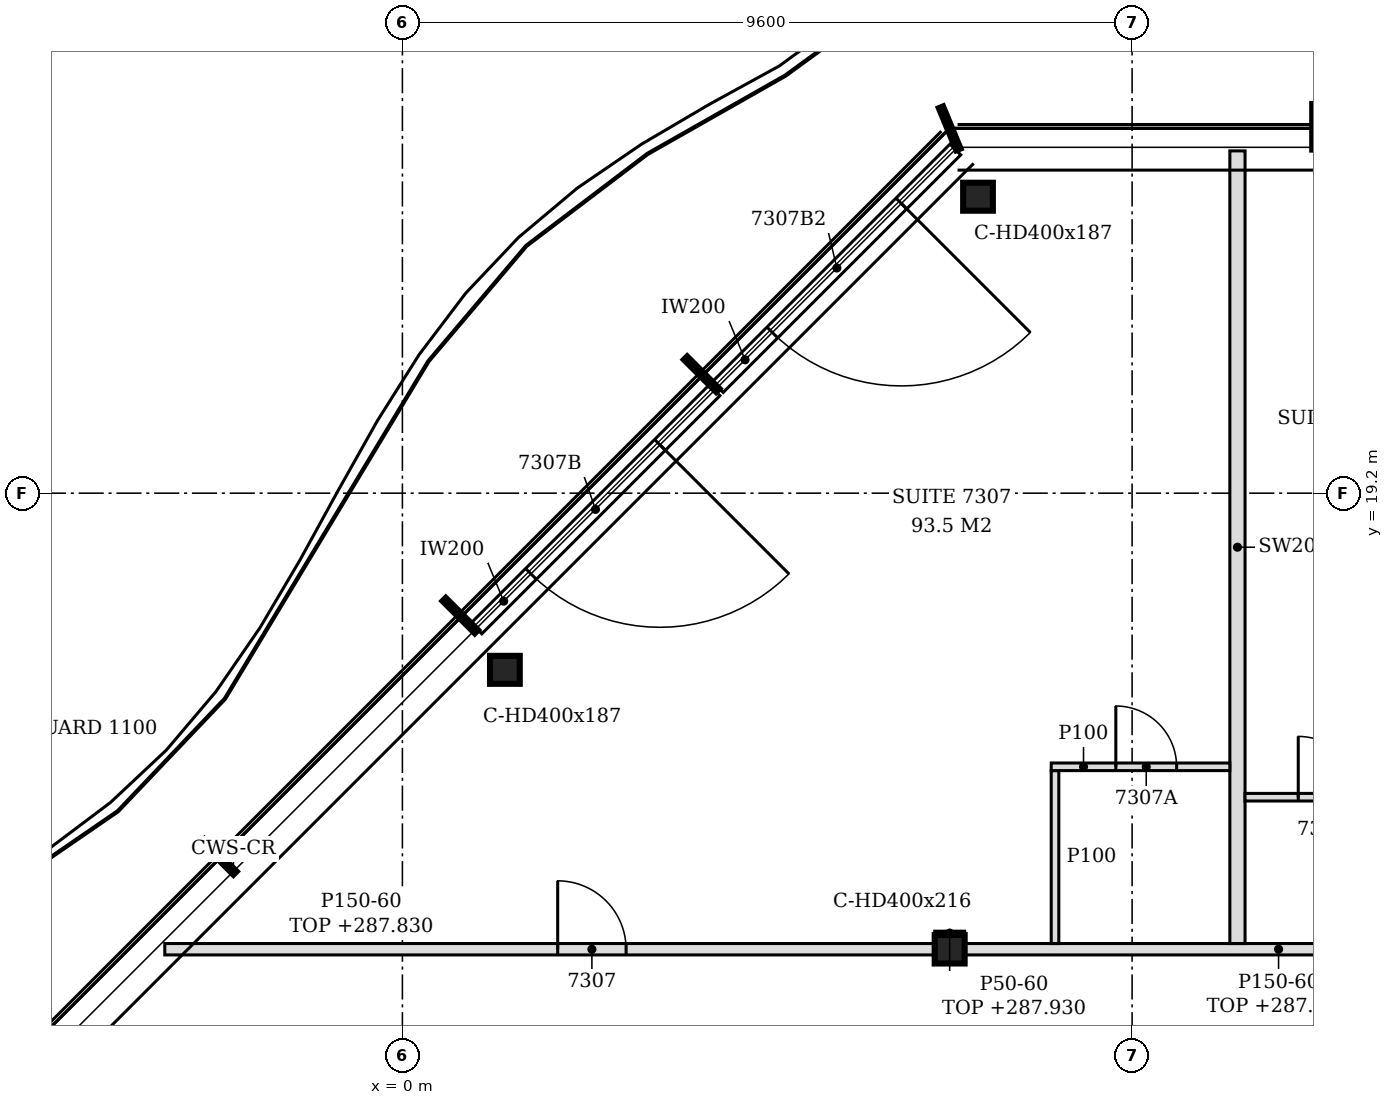
"""IFC4 building model, lengths in metres.
Left out: names, types, materials, properties, quantities, classifications, styles, units other than length and angle.
Written with IfcOpenShell. Run it as: python <this file> out.ifc"""

import sys

from ifc_helpers import new_model, si_unit, direction, frame, frame_2d, origin, origin_2d, place, context, subcontext, project, spatial, polyline, rectangle, i_section, outline, extrude, element, fill, save


model = new_model("IFC4")
c1 = context("Model", 3, precision=1e-05, world=origin(), true_north=direction((0.0, 1.0)))
c2 = subcontext(c1, "Body", "Model", "MODEL_VIEW")
j1 = project(units=[si_unit("LENGTHUNIT", "METRE"), si_unit("PLANEANGLEUNIT", "RADIAN")], contexts=[c1])
p1 = place(None, origin())
s1 = spatial("IfcSite", under=j1, at=p1, CompositionType="ELEMENT")
p2 = place(p1, origin())
s2 = spatial("IfcBuilding", under=s1, at=p2, CompositionType="ELEMENT")
p3 = place(p2, frame((0.0, 0.0, 285.0)))
s3 = spatial("IfcBuildingStorey", under=s2, at=p3, CompositionType="ELEMENT", Elevation=285.0)
for number, where, z_axis, x_axis in (
    (1, (7.573, 23.1, -0.15), (0.0, 0.0, 1.0), (1.0, 0.0, 0.0)),
    (2, (1.348, 16.876, -0.15), (0.0, 0.0, 1.0), (1.0, 0.0, 0.0)),
):
    element("IfcColumn", number, at=place(p3, frame(where, z_axis=z_axis, x_axis=x_axis)), inside=s3, PredefinedType="COLUMN", context=c2, shape_type="SweptSolid", body=[
        extrude(i_section(OverallWidth=0.391, OverallDepth=0.368, WebThickness=0.015, FlangeThickness=0.024, FilletRadius=0.015, at=origin_2d()), origin(), (0.0, 0.0, 1.0), 3.6),
    ])
p4 = place(p3, frame((7.2, 13.2, -0.15), z_axis=(0.0, 0.0, 1.0), x_axis=(1.0, 0.0, 0.0)))
e3 = element("IfcColumn", 3, at=p4, inside=s3, PredefinedType="COLUMN", context=c2, shape_type="SweptSolid", body=[
    extrude(i_section(OverallWidth=0.394, OverallDepth=0.375, WebThickness=0.017, FlangeThickness=0.028, FilletRadius=0.015, at=origin_2d()), origin(), (0.0, 0.0, 1.0), 3.6),
])
p5 = place(p3, frame((7.275, 23.722, 0.0), z_axis=(0.0, 0.0, 1.0), x_axis=(-0.707134392299, -0.707079168996, 0.0)))
e4 = element("IfcWall", 4, at=p5, inside=s3, PredefinedType="NOTDEFINED", context=c2, shape_type="SweptSolid", body=[
    extrude(rectangle(XDim=4.421, YDim=0.2, at=frame_2d((2.21, 0.0))), origin(), (0.0, 0.0, 1.0), 3.45),
])
p6 = place(p5, frame((1.005, 0.0, 0.0)))
e5 = element("IfcOpeningElement", 5, at=p6, cuts=e4, PredefinedType="OPENING", context=c2, shape_type="SweptSolid", body=[
    extrude(rectangle(XDim=2.4, YDim=2.4, at=frame_2d((1.2, 1.2))), frame((0.0, 0.11, 0.0), z_axis=(0.0, -1.0, 0.0), x_axis=(1.0, 0.0, 0.0)), (0.0, 0.0, 1.0), 0.22),
])
p7 = place(p3, frame((4.107, 20.553, 0.0), z_axis=(0.0, 0.0, 1.0), x_axis=(-0.707079231393, -0.707134329907, 0.0)))
e6 = element("IfcWall", 6, at=p7, inside=s3, PredefinedType="NOTDEFINED", context=c2, shape_type="SweptSolid", body=[
    extrude(rectangle(XDim=4.431, YDim=0.2, at=frame_2d((2.215, 0.0))), origin(), (0.0, 0.0, 1.0), 3.45),
])
p8 = place(p7, frame((1.015, 0.0, 0.0)))
e7 = element("IfcOpeningElement", 7, at=p8, cuts=e6, PredefinedType="OPENING", context=c2, shape_type="SweptSolid", body=[
    extrude(rectangle(XDim=2.4, YDim=2.4, at=frame_2d((1.2, 1.2))), frame((0.0, 0.11, 0.0), z_axis=(0.0, -1.0, 0.0), x_axis=(1.0, 0.0, 0.0)), (0.0, 0.0, 1.0), 0.22),
])
p9 = place(p3, frame((-3.126, 13.2, 0.0), z_axis=(0.0, 0.0, 1.0), x_axis=(1.0, 0.0, 0.0)))
e8 = element("IfcWall", 8, at=p9, inside=s3, PredefinedType="PARTITIONING", context=c2, shape_type="SweptSolid", body=[
    extrude(outline(polyline([(0.0, 0.0), (10.129, 0.0), (10.129, 2.83), (1.369, 2.83), (1.367, 2.63), (0.229, 2.63), (0.227, 2.83), (0.0, 2.83), (0.0, 0.0)])), frame((0.0, 0.075, 0.0), z_axis=(0.0, -1.0, 0.0), x_axis=(1.0, 0.0, 0.0)), (0.0, 0.0, 1.0), 0.15),
])
p10 = place(p9, frame((5.169, 0.0, 0.0)))
e9 = element("IfcOpeningElement", 9, at=p10, cuts=e8, PredefinedType="OPENING", context=c2, shape_type="SweptSolid", body=[
    extrude(rectangle(XDim=0.9, YDim=2.1, at=frame_2d((0.45, 1.05))), frame((0.0, 0.085, 0.0), z_axis=(0.0, -1.0, 0.0), x_axis=(1.0, 0.0, 0.0)), (0.0, 0.0, 1.0), 0.17),
])
p11 = place(p3, frame((7.397, 13.2, 0.0), z_axis=(0.0, 0.0, 1.0), x_axis=(1.0, 0.0, 0.0)))
e10 = element("IfcWall", 10, at=p11, inside=s3, PredefinedType="PARTITIONING", context=c2, shape_type="SweptSolid", body=[
    extrude(rectangle(XDim=11.606, YDim=0.15, at=frame_2d((5.803, 0.0))), origin(), (0.0, 0.0, 1.0), 2.83),
])
p12 = place(p11, frame((8.26, 0.0, 0.0)))
e11 = element("IfcOpeningElement", 11, at=p12, cuts=e10, PredefinedType="OPENING", context=c2, shape_type="SweptSolid", body=[
    extrude(rectangle(XDim=0.9, YDim=2.1, at=frame_2d((0.45, 1.05))), frame((0.0, 0.085, 0.0), z_axis=(0.0, -1.0, 0.0), x_axis=(1.0, 0.0, 0.0)), (0.0, 0.0, 1.0), 0.17),
])
p13 = place(p3, frame((8.586, 13.275, 0.0), z_axis=(0.0, 0.0, 1.0), x_axis=(0.0, 1.0, 0.0)))
e12 = element("IfcWall", 12, at=p13, inside=s3, PredefinedType="PARTITIONING", context=c2, shape_type="SweptSolid", body=[
    extrude(outline(polyline([(0.0, 0.0), (2.275, 0.0), (2.275, 3.45), (0.075, 3.45), (0.073, 2.83), (0.0, 2.83), (0.0, 0.0)])), frame((0.0, 0.05, 0.0), z_axis=(0.0, -1.0, 0.0), x_axis=(1.0, 0.0, 0.0)), (0.0, 0.0, 1.0), 0.1),
])
p14 = place(p3, frame((10.986, 13.275, 0.0), z_axis=(0.0, 0.0, 1.0), x_axis=(0.0, 1.0, 0.0)))
e13 = element("IfcWall", 13, at=p14, inside=s3, PredefinedType="PARTITIONING", context=c2, shape_type="SweptSolid", body=[
    extrude(outline(polyline([(0.0, 0.0), (10.428, 0.0), (10.428, 3.45), (9.975, 3.45), (9.973, 2.93), (9.675, 2.93), (9.673, 3.45), (6.03, 3.45), (6.028, 2.88), (5.82, 2.88), (5.818, 3.45), (0.075, 3.45), (0.073, 2.83), (0.0, 2.83), (0.0, 0.0)])), frame((0.0, 0.1, 0.0), z_axis=(0.0, -1.0, 0.0), x_axis=(1.0, 0.0, 0.0)), (0.0, 0.0, 1.0), 0.2),
])
p15 = place(p3, frame((11.086, 15.2, 0.0), z_axis=(0.0, 0.0, 1.0), x_axis=(1.0, 0.0, 0.0)))
e14 = element("IfcWall", 14, at=p15, inside=s3, PredefinedType="PARTITIONING", context=c2, shape_type="SweptSolid", body=[
    extrude(rectangle(XDim=2.35, YDim=0.1, at=frame_2d((1.175, 0.0))), origin(), (0.0, 0.0, 1.0), 3.45),
])
p16 = place(p15, frame((0.7, 0.0, 0.0)))
e15 = element("IfcOpeningElement", 15, at=p16, cuts=e14, PredefinedType="OPENING", context=c2, shape_type="SweptSolid", body=[
    extrude(rectangle(XDim=0.8, YDim=2.1, at=frame_2d((0.4, 1.05))), frame((0.0, 0.06, 0.0), z_axis=(0.0, -1.0, 0.0), x_axis=(1.0, 0.0, 0.0)), (0.0, 0.0, 1.0), 0.12),
])
p17 = place(p3, frame((8.536, 15.6, 0.0), z_axis=(0.0, 0.0, 1.0), x_axis=(1.0, 0.0, 0.0)))
e16 = element("IfcWall", 16, at=p17, inside=s3, PredefinedType="PARTITIONING", context=c2, shape_type="SweptSolid", body=[
    extrude(rectangle(XDim=2.35, YDim=0.1, at=frame_2d((1.175, 0.0))), origin(), (0.0, 0.0, 1.0), 3.45),
])
p18 = place(p17, frame((0.85, 0.0, 0.0)))
e17 = element("IfcOpeningElement", 17, at=p18, cuts=e16, PredefinedType="OPENING", context=c2, shape_type="SweptSolid", body=[
    extrude(rectangle(XDim=0.8, YDim=2.1, at=frame_2d((0.4, 1.05))), frame((0.0, 0.06, 0.0), z_axis=(0.0, -1.0, 0.0), x_axis=(1.0, 0.0, 0.0)), (0.0, 0.0, 1.0), 0.12),
])
p19 = place(p3, frame((7.003, 13.413, 0.0), z_axis=(0.0, 0.0, 1.0), x_axis=(1.0, 0.0, 0.0)))
e18 = element("IfcWall", 18, at=p19, inside=s3, PredefinedType="PARTITIONING", context=c2, shape_type="SweptSolid", body=[
    extrude(rectangle(XDim=0.394, YDim=0.05, at=frame_2d((0.197, 0.0))), origin(), (0.0, 0.0, 1.0), 2.93),
])
p20 = place(p6, origin())
e19 = element("IfcDoor", 19, at=p20, inside=s3, OperationType="SINGLE_SWING_LEFT", PredefinedType="DOOR", context=c2, shape_type="SweptSolid", body=[
    extrude(rectangle(XDim=2.4, YDim=2.4, at=frame_2d((1.2, 1.2))), frame((0.0, 0.025, 0.0), z_axis=(0.0, -1.0, 0.0), x_axis=(1.0, 0.0, 0.0)), (0.0, 0.0, 1.0), 0.05),
])
fill(e5, e19)
p21 = place(p8, origin())
e20 = element("IfcDoor", 20, at=p21, inside=s3, OperationType="SINGLE_SWING_LEFT", PredefinedType="DOOR", context=c2, shape_type="SweptSolid", body=[
    extrude(rectangle(XDim=2.4, YDim=2.4, at=frame_2d((1.2, 1.2))), frame((0.0, 0.025, 0.0), z_axis=(0.0, -1.0, 0.0), x_axis=(1.0, 0.0, 0.0)), (0.0, 0.0, 1.0), 0.05),
])
fill(e7, e20)
p22 = place(p16, origin())
e21 = element("IfcDoor", 21, at=p22, inside=s3, OperationType="SINGLE_SWING_LEFT", PredefinedType="DOOR", context=c2, shape_type="SweptSolid", body=[
    extrude(rectangle(XDim=0.8, YDim=2.1, at=frame_2d((0.4, 1.05))), frame((0.0, 0.025, 0.0), z_axis=(0.0, -1.0, 0.0), x_axis=(1.0, 0.0, 0.0)), (0.0, 0.0, 1.0), 0.05),
])
fill(e15, e21)
p23 = place(p10, origin())
e22 = element("IfcDoor", 22, at=p23, inside=s3, OperationType="SINGLE_SWING_LEFT", PredefinedType="DOOR", context=c2, shape_type="SweptSolid", body=[
    extrude(rectangle(XDim=0.9, YDim=2.1, at=frame_2d((0.45, 1.05))), frame((0.0, 0.025, 0.0), z_axis=(0.0, -1.0, 0.0), x_axis=(1.0, 0.0, 0.0)), (0.0, 0.0, 1.0), 0.05),
])
fill(e9, e22)
p24 = place(p18, origin())
e23 = element("IfcDoor", 23, at=p24, inside=s3, OperationType="SINGLE_SWING_LEFT", PredefinedType="DOOR", context=c2, shape_type="SweptSolid", body=[
    extrude(rectangle(XDim=0.8, YDim=2.1, at=frame_2d((0.4, 1.05))), frame((0.0, 0.025, 0.0), z_axis=(0.0, -1.0, 0.0), x_axis=(1.0, 0.0, 0.0)), (0.0, 0.0, 1.0), 0.05),
])
fill(e17, e23)
save(model, sys.argv[1])
